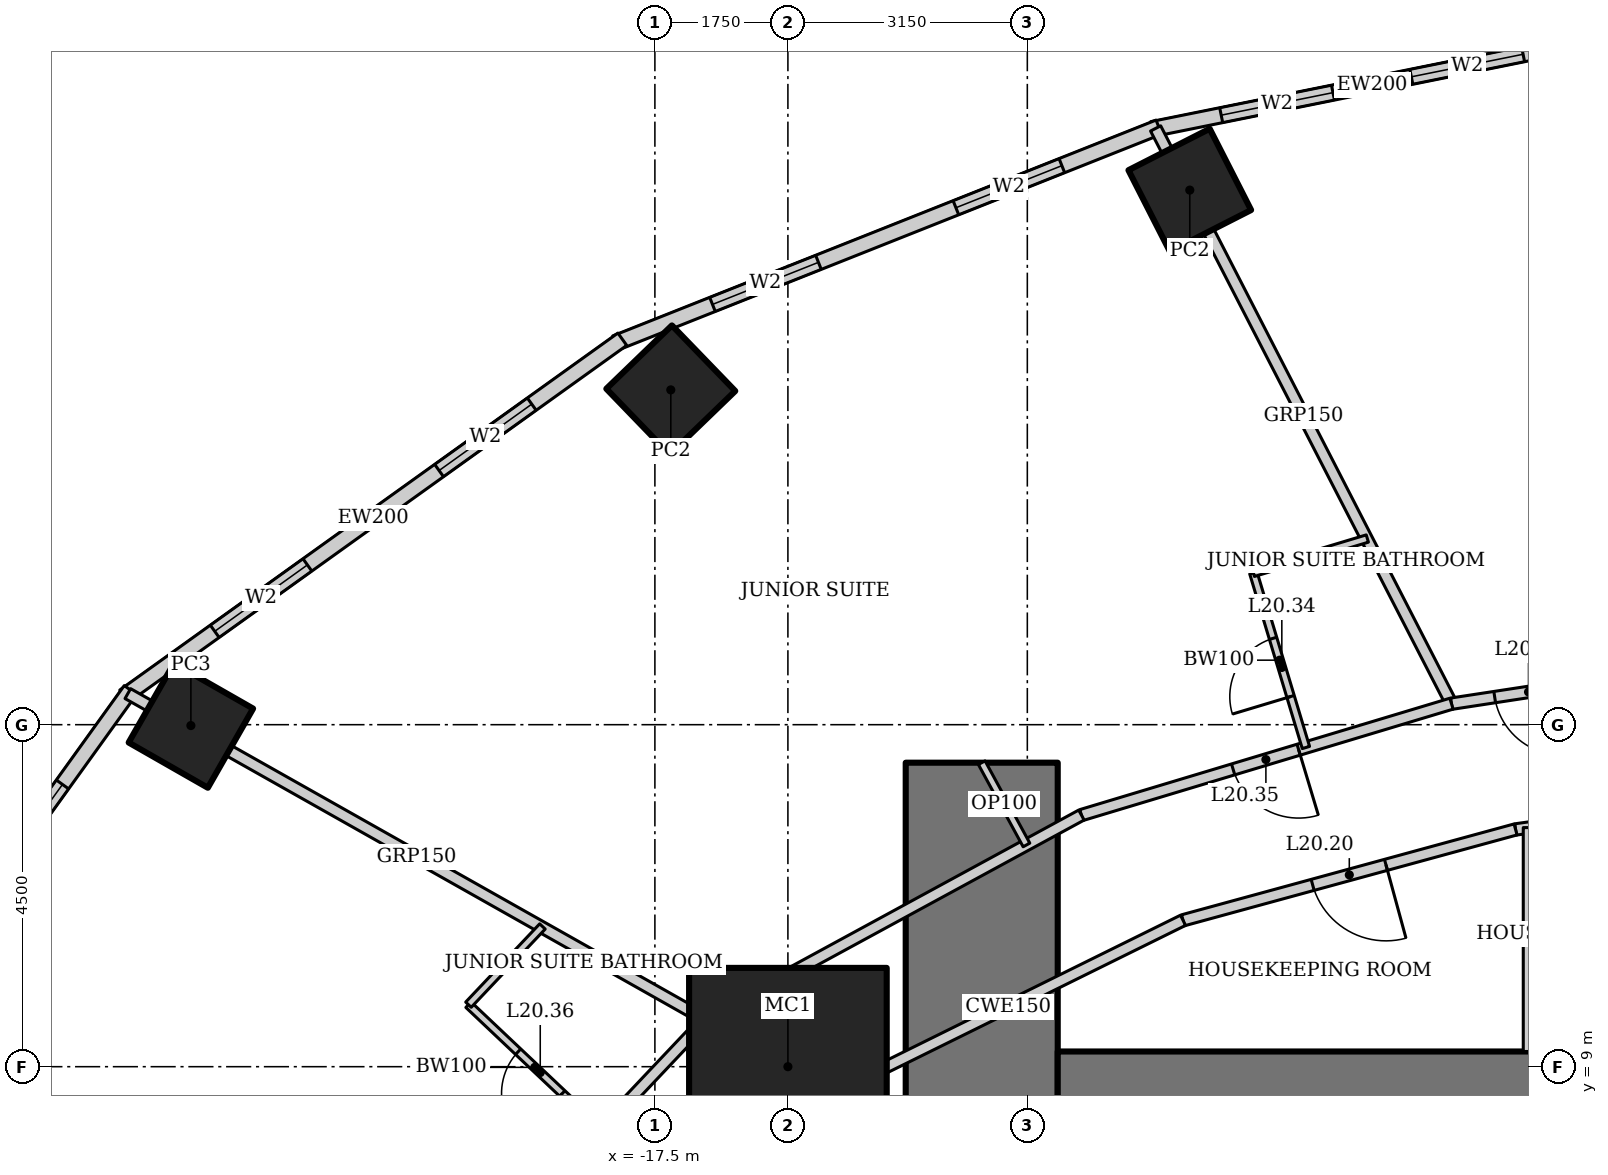
"""IFC4 building model, lengths in metres.
Left out: names, types, materials, properties, quantities, classifications, styles, units other than length and angle.
Written with IfcOpenShell. Run it as: python <this file> out.ifc"""

import sys

from ifc_helpers import new_model, si_unit, direction, frame, frame_2d, origin, origin_2d, place, context, subcontext, project, spatial, rectangle, hollow_rectangle, extrude, element, fill, save


model = new_model("IFC4")
c1 = context("Model", 3, precision=1e-05, world=origin(), true_north=direction((0.0, 1.0)))
c2 = subcontext(c1, "Body", "Model", "MODEL_VIEW")
j1 = project(units=[si_unit("LENGTHUNIT", "METRE"), si_unit("PLANEANGLEUNIT", "RADIAN")], contexts=[c1])
p1 = place(None, origin())
s1 = spatial("IfcSite", under=j1, at=p1, CompositionType="ELEMENT")
p2 = place(p1, origin())
s2 = spatial("IfcBuilding", under=s1, at=p2, CompositionType="ELEMENT")
p3 = place(p2, frame((0.0, 0.0, 87.4)))
s3 = spatial("IfcBuildingStorey", under=s2, at=p3, CompositionType="ELEMENT", Elevation=87.4)
p4 = place(p3, frame((-15.75, 9.0, 0.0), z_axis=(0.0, 0.0, 1.0), x_axis=(1.0, 0.0, 0.0)))
e1 = element("IfcColumn", 1, at=p4, inside=s3, PredefinedType="COLUMN", context=c2, shape_type="SweptSolid", body=[
    extrude(hollow_rectangle(XDim=2.6, YDim=2.6, WallThickness=0.13, at=origin_2d()), origin(), (0.0, 0.0, 1.0), 3.6),
])
for number, where, z_axis, x_axis in (
    (2, (-10.463, 20.534, 0.0), (0.0, 0.0, 1.0), (0.891, 0.454, 0.0)),
    (3, (-17.291, 17.905, 0.0), (0.0, 0.0, 1.0), (0.719, 0.695, 0.0)),
):
    element("IfcColumn", number, at=place(p3, frame(where, z_axis=z_axis, x_axis=x_axis)), inside=s3, PredefinedType="COLUMN", context=c2, shape_type="SweptSolid", body=[
        extrude(hollow_rectangle(XDim=1.2, YDim=1.2, WallThickness=0.1, at=origin_2d()), origin(), (0.0, 0.0, 1.0), 3.6),
    ])
p5 = place(p3, frame((-23.605, 13.489, 0.0), z_axis=(0.0, 0.0, 1.0), x_axis=(0.496139221777, 0.86824298017, 0.0)))
e4 = element("IfcColumn", 4, at=p5, inside=s3, PredefinedType="COLUMN", context=c2, shape_type="SweptSolid", body=[
    extrude(hollow_rectangle(XDim=1.2, YDim=1.2, WallThickness=0.12, at=origin_2d()), origin(), (0.0, 0.0, 1.0), 3.6),
])
p6 = place(p3, frame((-13.2, 13.0, 0.0), z_axis=(0.0, 0.0, 1.0), x_axis=(0.0, -1.0, 0.0)))
e5 = element("IfcWall", 5, at=p6, inside=s3, PredefinedType="SHEAR", context=c2, shape_type="SweptSolid", body=[
    extrude(rectangle(XDim=26.0, YDim=2.0, at=frame_2d((13.0, 0.0))), origin(), (0.0, 0.0, 1.0), 3.6),
])
p7 = place(p6, frame((12.1, 0.0, 0.0)))
e6 = element("IfcOpeningElement", 6, at=p7, cuts=e5, PredefinedType="OPENING", context=c2, shape_type="SweptSolid", body=[
    extrude(rectangle(XDim=1.8, YDim=2.1, at=frame_2d((0.9, 1.05))), frame((0.0, 1.01, 0.0), z_axis=(0.0, -1.0, 0.0), x_axis=(1.0, 0.0, 0.0)), (0.0, 0.0, 1.0), 2.02),
])
p8 = place(p3, frame((12.2, 8.0, 0.0), z_axis=(0.0, 0.0, 1.0), x_axis=(-1.0, 0.0, 0.0)))
e7 = element("IfcWall", 7, at=p8, inside=s3, PredefinedType="SHEAR", context=c2, shape_type="SweptSolid", body=[
    extrude(rectangle(XDim=24.4, YDim=2.4, at=frame_2d((12.2, 0.0))), origin(), (0.0, 0.0, 1.0), 3.6),
])
p9 = place(p3, frame((-5.17, 22.504, 0.0), z_axis=(0.0, 0.0, 1.0), x_axis=(-0.980251657452, -0.197754110105, 0.0)))
e8 = element("IfcWall", 8, at=p9, inside=s3, PredefinedType="SOLIDWALL", context=c2, shape_type="SweptSolid", body=[
    extrude(rectangle(XDim=5.904, YDim=0.2, at=frame_2d((2.952, 0.0))), origin(), (0.0, 0.0, 1.0), 3.45),
])
p10 = place(p9, frame((0.926, 0.0, 0.5)))
e9 = element("IfcOpeningElement", 9, at=p10, cuts=e8, PredefinedType="OPENING", context=c2, shape_type="SweptSolid", body=[
    extrude(rectangle(XDim=1.5, YDim=2.2, at=frame_2d((0.75, 1.1))), frame((0.0, 0.11, 0.0), z_axis=(0.0, -1.0, 0.0), x_axis=(1.0, 0.0, 0.0)), (0.0, 0.0, 1.0), 0.22),
])
p11 = place(p9, frame((3.478, 0.0, 0.5)))
e10 = element("IfcOpeningElement", 10, at=p11, cuts=e8, PredefinedType="OPENING", context=c2, shape_type="SweptSolid", body=[
    extrude(rectangle(XDim=1.5, YDim=2.2, at=frame_2d((0.75, 1.1))), frame((0.0, 0.11, 0.0), z_axis=(0.0, -1.0, 0.0), x_axis=(1.0, 0.0, 0.0)), (0.0, 0.0, 1.0), 0.22),
])
p12 = place(p3, frame((-10.869, 21.363, 0.0), z_axis=(0.0, 0.0, 1.0), x_axis=(-0.929358351251, -0.369178892895, 0.0)))
e11 = element("IfcWall", 11, at=p12, inside=s3, PredefinedType="SOLIDWALL", context=c2, shape_type="SweptSolid", body=[
    extrude(rectangle(XDim=7.692, YDim=0.2, at=frame_2d((3.846, 0.0))), origin(), (0.0, 0.0, 1.0), 3.45),
])
p13 = place(p12, frame((1.373, 0.0, 0.5)))
e12 = element("IfcOpeningElement", 12, at=p13, cuts=e11, PredefinedType="OPENING", context=c2, shape_type="SweptSolid", body=[
    extrude(rectangle(XDim=1.5, YDim=2.2, at=frame_2d((0.75, 1.1))), frame((0.0, 0.11, 0.0), z_axis=(0.0, -1.0, 0.0), x_axis=(1.0, 0.0, 0.0)), (0.0, 0.0, 1.0), 0.22),
])
p14 = place(p12, frame((4.819, 0.0, 0.5)))
e13 = element("IfcOpeningElement", 13, at=p14, cuts=e11, PredefinedType="OPENING", context=c2, shape_type="SweptSolid", body=[
    extrude(rectangle(XDim=1.5, YDim=2.2, at=frame_2d((0.75, 1.1))), frame((0.0, 0.11, 0.0), z_axis=(0.0, -1.0, 0.0), x_axis=(1.0, 0.0, 0.0)), (0.0, 0.0, 1.0), 0.22),
])
p15 = place(p3, frame((-17.929, 18.572, 0.0), z_axis=(0.0, 0.0, 1.0), x_axis=(-0.812791321576, -0.582554948112, 0.0)))
e14 = element("IfcWall", 14, at=p15, inside=s3, PredefinedType="SOLIDWALL", context=c2, shape_type="SweptSolid", body=[
    extrude(rectangle(XDim=8.063, YDim=0.2, at=frame_2d((4.032, 0.0))), origin(), (0.0, 0.0, 1.0), 3.45),
])
p16 = place(p15, frame((1.466, 0.0, 0.5)))
e15 = element("IfcOpeningElement", 15, at=p16, cuts=e14, PredefinedType="OPENING", context=c2, shape_type="SweptSolid", body=[
    extrude(rectangle(XDim=1.5, YDim=2.2, at=frame_2d((0.75, 1.1))), frame((0.0, 0.11, 0.0), z_axis=(0.0, -1.0, 0.0), x_axis=(1.0, 0.0, 0.0)), (0.0, 0.0, 1.0), 0.22),
])
p17 = place(p15, frame((5.097, 0.0, 0.5)))
e16 = element("IfcOpeningElement", 16, at=p17, cuts=e14, PredefinedType="OPENING", context=c2, shape_type="SweptSolid", body=[
    extrude(rectangle(XDim=1.5, YDim=2.2, at=frame_2d((0.75, 1.1))), frame((0.0, 0.11, 0.0), z_axis=(0.0, -1.0, 0.0), x_axis=(1.0, 0.0, 0.0)), (0.0, 0.0, 1.0), 0.22),
])
p18 = place(p3, frame((-24.4, 13.957, 0.0), z_axis=(0.0, 0.0, 1.0), x_axis=(-0.583937613703, -0.811798536155, 0.0)))
e17 = element("IfcWall", 17, at=p18, inside=s3, PredefinedType="SOLIDWALL", context=c2, shape_type="SweptSolid", body=[
    extrude(rectangle(XDim=8.323, YDim=0.2, at=frame_2d((4.162, 0.0))), origin(), (0.0, 0.0, 1.0), 3.45),
])
p19 = place(p18, frame((1.531, 0.0, 0.5)))
e18 = element("IfcOpeningElement", 18, at=p19, cuts=e17, PredefinedType="OPENING", context=c2, shape_type="SweptSolid", body=[
    extrude(rectangle(XDim=1.5, YDim=2.2, at=frame_2d((0.75, 1.1))), frame((0.0, 0.11, 0.0), z_axis=(0.0, -1.0, 0.0), x_axis=(1.0, 0.0, 0.0)), (0.0, 0.0, 1.0), 0.22),
])
p20 = place(p18, frame((5.292, 0.0, 0.5)))
e19 = element("IfcOpeningElement", 19, at=p20, cuts=e17, PredefinedType="OPENING", context=c2, shape_type="SweptSolid", body=[
    extrude(rectangle(XDim=1.5, YDim=2.2, at=frame_2d((0.75, 1.1))), frame((0.0, 0.11, 0.0), z_axis=(0.0, -1.0, 0.0), x_axis=(1.0, 0.0, 0.0)), (0.0, 0.0, 1.0), 0.22),
])
p21 = place(p3, frame((-10.912, 21.346, 0.0), z_axis=(0.0, 0.0, 1.0), x_axis=(0.457327273085, -0.889298468059, 0.0)))
e20 = element("IfcWall", 20, at=p21, inside=s3, PredefinedType="PARTITIONING", context=c2, shape_type="SweptSolid", body=[
    extrude(rectangle(XDim=8.511, YDim=0.15, at=frame_2d((4.256, 0.0))), origin(), (0.0, 0.0, 1.0), 2.528),
])
p22 = place(p3, frame((-24.435, 13.909, 0.0), z_axis=(0.0, 0.0, 1.0), x_axis=(0.87090601027, -0.491449612143, 0.0)))
e21 = element("IfcWall", 21, at=p22, inside=s3, PredefinedType="PARTITIONING", context=c2, shape_type="SweptSolid", body=[
    extrude(rectangle(XDim=8.726, YDim=0.15, at=frame_2d((4.363, 0.0))), origin(), (0.0, 0.0, 1.0), 2.693),
])
p23 = place(p3, frame((-3.311, 14.342, 0.0), z_axis=(0.0, 0.0, 1.0), x_axis=(-0.988564270062, -0.150800145746, 0.0)))
e22 = element("IfcWall", 22, at=p23, inside=s3, PredefinedType="PARTITIONING", context=c2, shape_type="SweptSolid", body=[
    extrude(rectangle(XDim=3.751, YDim=0.15, at=frame_2d((1.875, 0.0))), origin(), (0.0, 0.0, 1.0), 3.45),
])
p24 = place(p23, frame((2.276, 0.0, 0.0)))
e23 = element("IfcOpeningElement", 23, at=p24, cuts=e22, PredefinedType="OPENING", context=c2, shape_type="SweptSolid", body=[
    extrude(rectangle(XDim=0.9, YDim=2.1, at=frame_2d((0.45, 1.05))), frame((0.0, 0.085, 0.0), z_axis=(0.0, -1.0, 0.0), x_axis=(1.0, 0.0, 0.0)), (0.0, 0.0, 1.0), 0.17),
])
p25 = place(p3, frame((-7.019, 13.776, 0.0), z_axis=(0.0, 0.0, 1.0), x_axis=(-0.957564241242, -0.288219922793, 0.0)))
e24 = element("IfcWall", 24, at=p25, inside=s3, PredefinedType="PARTITIONING", context=c2, shape_type="SweptSolid", body=[
    extrude(rectangle(XDim=5.085, YDim=0.15, at=frame_2d((2.542, 0.0))), origin(), (0.0, 0.0, 1.0), 3.45),
])
p26 = place(p25, frame((2.1, 0.0, 0.0)))
e25 = element("IfcOpeningElement", 25, at=p26, cuts=e24, PredefinedType="OPENING", context=c2, shape_type="SweptSolid", body=[
    extrude(rectangle(XDim=0.9, YDim=2.1, at=frame_2d((0.45, 1.05))), frame((0.0, 0.085, 0.0), z_axis=(0.0, -1.0, 0.0), x_axis=(1.0, 0.0, 0.0)), (0.0, 0.0, 1.0), 0.17),
])
p27 = place(p3, frame((-11.888, 12.311, 0.0), z_axis=(0.0, 0.0, 1.0), x_axis=(-0.878450059298, -0.477834169267, 0.0)))
e26 = element("IfcWall", 26, at=p27, inside=s3, PredefinedType="PARTITIONING", context=c2, shape_type="SweptSolid", body=[
    extrude(rectangle(XDim=5.631, YDim=0.15, at=frame_2d((2.815, 0.0))), origin(), (0.0, 0.0, 1.0), 3.45),
])
p28 = place(p3, frame((-16.835, 9.62, 0.0), z_axis=(0.0, 0.0, 1.0), x_axis=(-0.687062608696, -0.726598218916, 0.0)))
e27 = element("IfcWall", 27, at=p28, inside=s3, PredefinedType="PARTITIONING", context=c2, shape_type="SweptSolid", body=[
    extrude(rectangle(XDim=6.039, YDim=0.15, at=frame_2d((3.02, 0.0))), origin(), (0.0, 0.0, 1.0), 3.45),
])
p29 = place(p3, frame((-2.903, 12.574, 0.0), z_axis=(0.0, 0.0, 1.0), x_axis=(-0.990563451353, -0.137054911782, 0.0)))
e28 = element("IfcWall", 28, at=p29, inside=s3, PredefinedType="PARTITIONING", context=c2, shape_type="SweptSolid", body=[
    extrude(rectangle(XDim=3.304, YDim=0.15, at=frame_2d((1.652, 0.0))), origin(), (0.0, 0.0, 1.0), 3.45),
])
p30 = place(p29, frame((1.308, 0.0, 0.0)))
e29 = element("IfcOpeningElement", 29, at=p30, cuts=e28, PredefinedType="OPENING", context=c2, shape_type="SweptSolid", body=[
    extrude(rectangle(XDim=0.9, YDim=2.1, at=frame_2d((0.45, 1.05))), frame((0.0, 0.085, 0.0), z_axis=(0.0, -1.0, 0.0), x_axis=(1.0, 0.0, 0.0)), (0.0, 0.0, 1.0), 0.17),
])
p31 = place(p3, frame((-6.176, 12.122, 0.0), z_axis=(0.0, 0.0, 1.0), x_axis=(-0.964644466646, -0.263554648923, 0.0)))
e30 = element("IfcWall", 30, at=p31, inside=s3, PredefinedType="PARTITIONING", context=c2, shape_type="SweptSolid", body=[
    extrude(rectangle(XDim=4.535, YDim=0.15, at=frame_2d((2.268, 0.0))), origin(), (0.0, 0.0, 1.0), 3.45),
])
p32 = place(p31, frame((1.768, 0.0, 0.0)))
e31 = element("IfcOpeningElement", 31, at=p32, cuts=e30, PredefinedType="OPENING", context=c2, shape_type="SweptSolid", body=[
    extrude(rectangle(XDim=1.0, YDim=2.1, at=frame_2d((0.5, 1.05))), frame((0.0, 0.085, 0.0), z_axis=(0.0, -1.0, 0.0), x_axis=(1.0, 0.0, 0.0)), (0.0, 0.0, 1.0), 0.17),
])
p33 = place(p3, frame((-10.551, 10.926, 0.0), z_axis=(0.0, 0.0, 1.0), x_axis=(-0.89656943448, -0.442903205177, 0.0)))
e32 = element("IfcWall", 32, at=p33, inside=s3, PredefinedType="PARTITIONING", context=c2, shape_type="SweptSolid", body=[
    extrude(rectangle(XDim=5.126, YDim=0.15, at=frame_2d((2.563, 0.0))), origin(), (0.0, 0.0, 1.0), 3.45),
])
p34 = place(p3, frame((-15.147, 8.656, 0.0), z_axis=(0.0, 0.0, 1.0), x_axis=(-0.720837261072, -0.693104352209, 0.0)))
e33 = element("IfcWall", 33, at=p34, inside=s3, PredefinedType="PARTITIONING", context=c2, shape_type="SweptSolid", body=[
    extrude(rectangle(XDim=5.59, YDim=0.15, at=frame_2d((2.795, 0.0))), origin(), (0.0, 0.0, 1.0), 3.45),
])
p35 = place(p34, frame((2.295, 0.0, 0.0)))
e34 = element("IfcOpeningElement", 34, at=p35, cuts=e33, PredefinedType="OPENING", context=c2, shape_type="SweptSolid", body=[
    extrude(rectangle(XDim=1.0, YDim=2.1, at=frame_2d((0.5, 1.05))), frame((0.0, 0.085, 0.0), z_axis=(0.0, -1.0, 0.0), x_axis=(1.0, 0.0, 0.0)), (0.0, 0.0, 1.0), 0.17),
])
p36 = place(p3, frame((-6.0, 9.2, 0.0), z_axis=(0.0, 0.0, 1.0), x_axis=(0.0, 1.0, 0.0)))
e35 = element("IfcWall", 35, at=p36, inside=s3, PredefinedType="SOLIDWALL", context=c2, shape_type="SweptSolid", body=[
    extrude(rectangle(XDim=2.946, YDim=0.15, at=frame_2d((1.473, 0.0))), origin(), (0.0, 0.0, 1.0), 3.046),
])
p37 = place(p3, frame((-8.935, 13.2, 0.0), z_axis=(0.0, 0.0, 1.0), x_axis=(-0.288197066254, 0.957571120598, 0.0)))
e36 = element("IfcWall", 36, at=p37, inside=s3, PredefinedType="PARTITIONING", context=c2, shape_type="SweptSolid", body=[
    extrude(rectangle(XDim=2.4, YDim=0.1, at=frame_2d((1.2, 0.0))), origin(), (0.0, 0.0, 1.0), 3.45),
])
p38 = place(p37, frame((0.7, 0.0, 0.0)))
e37 = element("IfcOpeningElement", 37, at=p38, cuts=e36, PredefinedType="OPENING", context=c2, shape_type="SweptSolid", body=[
    extrude(rectangle(XDim=0.8, YDim=2.1, at=frame_2d((0.4, 1.05))), frame((0.0, 0.06, 0.0), z_axis=(0.0, -1.0, 0.0), x_axis=(1.0, 0.0, 0.0)), (0.0, 0.0, 1.0), 0.12),
])
p39 = place(p3, frame((-9.626, 15.498, 0.0), z_axis=(0.0, 0.0, 1.0), x_axis=(0.957551231109, 0.288263143328, 0.0)))
e38 = element("IfcWall", 38, at=p39, inside=s3, PredefinedType="PARTITIONING", context=c2, shape_type="SweptSolid", body=[
    extrude(rectangle(XDim=1.566, YDim=0.1, at=frame_2d((0.783, 0.0))), origin(), (0.0, 0.0, 1.0), 3.45),
])
p40 = place(p3, frame((-18.209, 8.167, 0.0), z_axis=(0.0, 0.0, 1.0), x_axis=(-0.726567238928, 0.687095369885, 0.0)))
e39 = element("IfcWall", 39, at=p40, inside=s3, PredefinedType="PARTITIONING", context=c2, shape_type="SweptSolid", body=[
    extrude(rectangle(XDim=2.4, YDim=0.1, at=frame_2d((1.2, 0.0))), origin(), (0.0, 0.0, 1.0), 3.45),
])
p41 = place(p40, frame((0.7, 0.0, 0.0)))
e40 = element("IfcOpeningElement", 40, at=p41, cuts=e39, PredefinedType="OPENING", context=c2, shape_type="SweptSolid", body=[
    extrude(rectangle(XDim=0.8, YDim=2.1, at=frame_2d((0.4, 1.05))), frame((0.0, 0.06, 0.0), z_axis=(0.0, -1.0, 0.0), x_axis=(1.0, 0.0, 0.0)), (0.0, 0.0, 1.0), 0.12),
])
p42 = place(p3, frame((-19.953, 9.816, 0.0), z_axis=(0.0, 0.0, 1.0), x_axis=(0.687017997787, 0.726640399866, 0.0)))
e41 = element("IfcWall", 41, at=p42, inside=s3, PredefinedType="PARTITIONING", context=c2, shape_type="SweptSolid", body=[
    extrude(rectangle(XDim=1.417, YDim=0.1, at=frame_2d((0.708, 0.0))), origin(), (0.0, 0.0, 1.0), 3.45),
])
p43 = place(p3, frame((-13.2, 13.0, 0.0), z_axis=(0.0, 0.0, 1.0), x_axis=(0.477852414256, -0.878440134665, 0.0)))
e42 = element("IfcWall", 42, at=p43, inside=s3, PredefinedType="PARTITIONING", context=c2, shape_type="SweptSolid", body=[
    extrude(rectangle(XDim=1.232, YDim=0.1, at=frame_2d((0.616, 0.0))), origin(), (0.0, 0.0, 1.0), 3.45),
])
p44 = place(p10, origin())
e43 = element("IfcWindow", 43, at=p44, inside=s3, PartitioningType="SINGLE_PANEL", PredefinedType="WINDOW", context=c2, shape_type="SweptSolid", body=[
    extrude(rectangle(XDim=1.5, YDim=2.2, at=frame_2d((0.75, 1.1))), frame((0.0, 0.03, 0.0), z_axis=(0.0, -1.0, 0.0), x_axis=(1.0, 0.0, 0.0)), (0.0, 0.0, 1.0), 0.06),
])
fill(e9, e43)
p45 = place(p11, origin())
e44 = element("IfcWindow", 44, at=p45, inside=s3, PartitioningType="SINGLE_PANEL", PredefinedType="WINDOW", context=c2, shape_type="SweptSolid", body=[
    extrude(rectangle(XDim=1.5, YDim=2.2, at=frame_2d((0.75, 1.1))), frame((0.0, 0.03, 0.0), z_axis=(0.0, -1.0, 0.0), x_axis=(1.0, 0.0, 0.0)), (0.0, 0.0, 1.0), 0.06),
])
fill(e10, e44)
p46 = place(p13, origin())
e45 = element("IfcWindow", 45, at=p46, inside=s3, PartitioningType="SINGLE_PANEL", PredefinedType="WINDOW", context=c2, shape_type="SweptSolid", body=[
    extrude(rectangle(XDim=1.5, YDim=2.2, at=frame_2d((0.75, 1.1))), frame((0.0, 0.03, 0.0), z_axis=(0.0, -1.0, 0.0), x_axis=(1.0, 0.0, 0.0)), (0.0, 0.0, 1.0), 0.06),
])
fill(e12, e45)
p47 = place(p14, origin())
e46 = element("IfcWindow", 46, at=p47, inside=s3, PartitioningType="SINGLE_PANEL", PredefinedType="WINDOW", context=c2, shape_type="SweptSolid", body=[
    extrude(rectangle(XDim=1.5, YDim=2.2, at=frame_2d((0.75, 1.1))), frame((0.0, 0.03, 0.0), z_axis=(0.0, -1.0, 0.0), x_axis=(1.0, 0.0, 0.0)), (0.0, 0.0, 1.0), 0.06),
])
fill(e13, e46)
p48 = place(p16, origin())
e47 = element("IfcWindow", 47, at=p48, inside=s3, PartitioningType="SINGLE_PANEL", PredefinedType="WINDOW", context=c2, shape_type="SweptSolid", body=[
    extrude(rectangle(XDim=1.5, YDim=2.2, at=frame_2d((0.75, 1.1))), frame((0.0, 0.03, 0.0), z_axis=(0.0, -1.0, 0.0), x_axis=(1.0, 0.0, 0.0)), (0.0, 0.0, 1.0), 0.06),
])
fill(e15, e47)
p49 = place(p17, origin())
e48 = element("IfcWindow", 48, at=p49, inside=s3, PartitioningType="SINGLE_PANEL", PredefinedType="WINDOW", context=c2, shape_type="SweptSolid", body=[
    extrude(rectangle(XDim=1.5, YDim=2.2, at=frame_2d((0.75, 1.1))), frame((0.0, 0.03, 0.0), z_axis=(0.0, -1.0, 0.0), x_axis=(1.0, 0.0, 0.0)), (0.0, 0.0, 1.0), 0.06),
])
fill(e16, e48)
p50 = place(p19, origin())
e49 = element("IfcWindow", 49, at=p50, inside=s3, PartitioningType="SINGLE_PANEL", PredefinedType="WINDOW", context=c2, shape_type="SweptSolid", body=[
    extrude(rectangle(XDim=1.5, YDim=2.2, at=frame_2d((0.75, 1.1))), frame((0.0, 0.03, 0.0), z_axis=(0.0, -1.0, 0.0), x_axis=(1.0, 0.0, 0.0)), (0.0, 0.0, 1.0), 0.06),
])
fill(e18, e49)
p51 = place(p32, origin())
e50 = element("IfcDoor", 50, at=p51, inside=s3, OperationType="SINGLE_SWING_LEFT", PredefinedType="DOOR", context=c2, shape_type="SweptSolid", body=[
    extrude(rectangle(XDim=1.0, YDim=2.1, at=frame_2d((0.5, 1.05))), frame((0.0, 0.025, 0.0), z_axis=(0.0, -1.0, 0.0), x_axis=(1.0, 0.0, 0.0)), (0.0, 0.0, 1.0), 0.05),
])
fill(e31, e50)
p52 = place(p24, origin())
e51 = element("IfcDoor", 51, at=p52, inside=s3, OperationType="SINGLE_SWING_LEFT", PredefinedType="DOOR", context=c2, shape_type="SweptSolid", body=[
    extrude(rectangle(XDim=0.9, YDim=2.1, at=frame_2d((0.45, 1.05))), frame((0.0, 0.025, 0.0), z_axis=(0.0, -1.0, 0.0), x_axis=(1.0, 0.0, 0.0)), (0.0, 0.0, 1.0), 0.05),
])
fill(e23, e51)
p53 = place(p38, origin())
e52 = element("IfcDoor", 52, at=p53, inside=s3, OperationType="SINGLE_SWING_LEFT", PredefinedType="DOOR", context=c2, shape_type="SweptSolid", body=[
    extrude(rectangle(XDim=0.8, YDim=2.1, at=frame_2d((0.4, 1.05))), frame((0.0, 0.025, 0.0), z_axis=(0.0, -1.0, 0.0), x_axis=(1.0, 0.0, 0.0)), (0.0, 0.0, 1.0), 0.05),
])
fill(e37, e52)
p54 = place(p26, origin())
e53 = element("IfcDoor", 53, at=p54, inside=s3, OperationType="SINGLE_SWING_LEFT", PredefinedType="DOOR", context=c2, shape_type="SweptSolid", body=[
    extrude(rectangle(XDim=0.9, YDim=2.1, at=frame_2d((0.45, 1.05))), frame((0.0, 0.025, 0.0), z_axis=(0.0, -1.0, 0.0), x_axis=(1.0, 0.0, 0.0)), (0.0, 0.0, 1.0), 0.05),
])
fill(e25, e53)
p55 = place(p41, origin())
e54 = element("IfcDoor", 54, at=p55, inside=s3, OperationType="SINGLE_SWING_LEFT", PredefinedType="DOOR", context=c2, shape_type="SweptSolid", body=[
    extrude(rectangle(XDim=0.8, YDim=2.1, at=frame_2d((0.4, 1.05))), frame((0.0, 0.025, 0.0), z_axis=(0.0, -1.0, 0.0), x_axis=(1.0, 0.0, 0.0)), (0.0, 0.0, 1.0), 0.05),
])
fill(e40, e54)
save(model, sys.argv[1])
